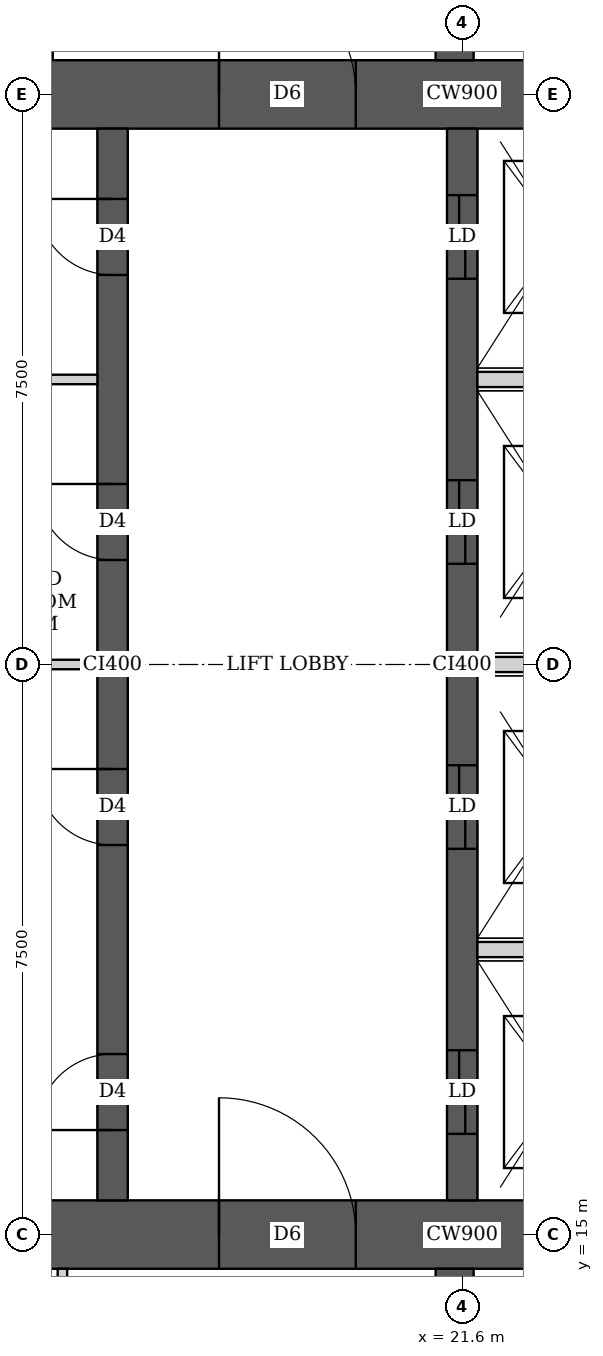
"""IFC4 building model, lengths in metres.
Left out: names, types, materials, properties, quantities, classifications, styles, units other than length and angle.
Written with IfcOpenShell. Run it as: python <this file> out.ifc"""

import sys

from ifc_helpers import new_model, si_unit, direction, frame, frame_2d, origin, place, context, subcontext, project, spatial, rectangle, extrude, element, fill, save


model = new_model("IFC4")
c1 = context("Model", 3, precision=1e-05, world=origin(), true_north=direction((0.0, 1.0)))
c2 = subcontext(c1, "Body", "Model", "MODEL_VIEW")
j1 = project(units=[si_unit("LENGTHUNIT", "METRE"), si_unit("PLANEANGLEUNIT", "RADIAN")], contexts=[c1])
p1 = place(None, origin())
s1 = spatial("IfcSite", under=j1, at=p1, CompositionType="ELEMENT")
p2 = place(p1, origin())
s2 = spatial("IfcBuilding", under=s1, at=p2, CompositionType="ELEMENT")
p3 = place(p2, frame((0.0, 0.0, 184.55)))
s3 = spatial("IfcBuildingStorey", under=s2, at=p3, CompositionType="ELEMENT", Elevation=184.55)
p4 = place(p3, frame((13.95, 15.0, 0.0), z_axis=(0.0, 0.0, 1.0), x_axis=(1.0, 0.0, 0.0)))
e1 = element("IfcWall", 1, at=p4, inside=s3, PredefinedType="SHEAR", context=c2, shape_type="SweptSolid", body=[
    extrude(rectangle(XDim=15.3, YDim=0.9, at=frame_2d((7.65, 0.0))), origin(), (0.0, 0.0, 1.0), 3.75),
])
p5 = place(p4, frame((4.45, 0.0, 0.0)))
e2 = element("IfcOpeningElement", 2, at=p5, cuts=e1, PredefinedType="OPENING", context=c2, shape_type="SweptSolid", body=[
    extrude(rectangle(XDim=1.8, YDim=2.1, at=frame_2d((0.9, 1.05))), frame((0.0, 0.46, 0.0), z_axis=(0.0, -1.0, 0.0), x_axis=(1.0, 0.0, 0.0)), (0.0, 0.0, 1.0), 0.92),
])
p6 = place(p4, frame((10.7, 0.0, 0.0)))
e3 = element("IfcOpeningElement", 3, at=p6, cuts=e1, PredefinedType="OPENING", context=c2, shape_type="SweptSolid", body=[
    extrude(rectangle(XDim=1.1, YDim=2.1, at=frame_2d((0.55, 1.05))), frame((0.0, 0.46, 0.0), z_axis=(0.0, -1.0, 0.0), x_axis=(1.0, 0.0, 0.0)), (0.0, 0.0, 1.0), 0.92),
])
p7 = place(p3, frame((13.95, 30.0, 0.0), z_axis=(0.0, 0.0, 1.0), x_axis=(1.0, 0.0, 0.0)))
e4 = element("IfcWall", 4, at=p7, inside=s3, PredefinedType="SHEAR", context=c2, shape_type="SweptSolid", body=[
    extrude(rectangle(XDim=15.3, YDim=0.9, at=frame_2d((7.65, 0.0))), origin(), (0.0, 0.0, 1.0), 3.75),
])
p8 = place(p7, frame((4.45, 0.0, 0.0)))
e5 = element("IfcOpeningElement", 5, at=p8, cuts=e4, PredefinedType="OPENING", context=c2, shape_type="SweptSolid", body=[
    extrude(rectangle(XDim=1.8, YDim=2.1, at=frame_2d((0.9, 1.05))), frame((0.0, 0.46, 0.0), z_axis=(0.0, -1.0, 0.0), x_axis=(1.0, 0.0, 0.0)), (0.0, 0.0, 1.0), 0.92),
])
p9 = place(p7, frame((10.7, 0.0, 0.0)))
e6 = element("IfcOpeningElement", 6, at=p9, cuts=e4, PredefinedType="OPENING", context=c2, shape_type="SweptSolid", body=[
    extrude(rectangle(XDim=1.1, YDim=2.1, at=frame_2d((0.55, 1.05))), frame((0.0, 0.46, 0.0), z_axis=(0.0, -1.0, 0.0), x_axis=(1.0, 0.0, 0.0)), (0.0, 0.0, 1.0), 0.92),
])
p10 = place(p3, frame((17.0, 15.45, 0.0), z_axis=(0.0, 0.0, 1.0), x_axis=(0.0, 1.0, 0.0)))
e7 = element("IfcWall", 7, at=p10, inside=s3, PredefinedType="SHEAR", context=c2, shape_type="SweptSolid", body=[
    extrude(rectangle(XDim=14.1, YDim=0.4, at=frame_2d((7.05, 0.0))), origin(), (0.0, 0.0, 1.0), 3.75),
])
p11 = place(p10, frame((0.925, 0.0, 0.0)))
e8 = element("IfcOpeningElement", 8, at=p11, cuts=e7, PredefinedType="OPENING", context=c2, shape_type="SweptSolid", body=[
    extrude(rectangle(XDim=1.0, YDim=2.1, at=frame_2d((0.5, 1.05))), frame((0.0, 0.21, 0.0), z_axis=(0.0, -1.0, 0.0), x_axis=(1.0, 0.0, 0.0)), (0.0, 0.0, 1.0), 0.42),
])
p12 = place(p10, frame((4.675, 0.0, 0.0)))
e9 = element("IfcOpeningElement", 9, at=p12, cuts=e7, PredefinedType="OPENING", context=c2, shape_type="SweptSolid", body=[
    extrude(rectangle(XDim=1.0, YDim=2.1, at=frame_2d((0.5, 1.05))), frame((0.0, 0.21, 0.0), z_axis=(0.0, -1.0, 0.0), x_axis=(1.0, 0.0, 0.0)), (0.0, 0.0, 1.0), 0.42),
])
p13 = place(p10, frame((8.425, 0.0, 0.0)))
e10 = element("IfcOpeningElement", 10, at=p13, cuts=e7, PredefinedType="OPENING", context=c2, shape_type="SweptSolid", body=[
    extrude(rectangle(XDim=1.0, YDim=2.1, at=frame_2d((0.5, 1.05))), frame((0.0, 0.21, 0.0), z_axis=(0.0, -1.0, 0.0), x_axis=(1.0, 0.0, 0.0)), (0.0, 0.0, 1.0), 0.42),
])
p14 = place(p10, frame((12.175, 0.0, 0.0)))
e11 = element("IfcOpeningElement", 11, at=p14, cuts=e7, PredefinedType="OPENING", context=c2, shape_type="SweptSolid", body=[
    extrude(rectangle(XDim=1.0, YDim=2.1, at=frame_2d((0.5, 1.05))), frame((0.0, 0.21, 0.0), z_axis=(0.0, -1.0, 0.0), x_axis=(1.0, 0.0, 0.0)), (0.0, 0.0, 1.0), 0.42),
])
p15 = place(p3, frame((21.6, 15.45, 0.0), z_axis=(0.0, 0.0, 1.0), x_axis=(0.0, 1.0, 0.0)))
e12 = element("IfcWall", 12, at=p15, inside=s3, PredefinedType="SHEAR", context=c2, shape_type="SweptSolid", body=[
    extrude(rectangle(XDim=14.1, YDim=0.4, at=frame_2d((7.05, 0.0))), origin(), (0.0, 0.0, 1.0), 3.75),
])
p16 = place(p15, frame((0.875, 0.0, 0.0)))
e13 = element("IfcOpeningElement", 13, at=p16, cuts=e12, PredefinedType="OPENING", context=c2, shape_type="SweptSolid", body=[
    extrude(rectangle(XDim=1.1, YDim=2.1, at=frame_2d((0.55, 1.05))), frame((0.0, 0.21, 0.0), z_axis=(0.0, -1.0, 0.0), x_axis=(1.0, 0.0, 0.0)), (0.0, 0.0, 1.0), 0.42),
])
p17 = place(p15, frame((4.625, 0.0, 0.0)))
e14 = element("IfcOpeningElement", 14, at=p17, cuts=e12, PredefinedType="OPENING", context=c2, shape_type="SweptSolid", body=[
    extrude(rectangle(XDim=1.1, YDim=2.1, at=frame_2d((0.55, 1.05))), frame((0.0, 0.21, 0.0), z_axis=(0.0, -1.0, 0.0), x_axis=(1.0, 0.0, 0.0)), (0.0, 0.0, 1.0), 0.42),
])
p18 = place(p15, frame((8.375, 0.0, 0.0)))
e15 = element("IfcOpeningElement", 15, at=p18, cuts=e12, PredefinedType="OPENING", context=c2, shape_type="SweptSolid", body=[
    extrude(rectangle(XDim=1.1, YDim=2.1, at=frame_2d((0.55, 1.05))), frame((0.0, 0.21, 0.0), z_axis=(0.0, -1.0, 0.0), x_axis=(1.0, 0.0, 0.0)), (0.0, 0.0, 1.0), 0.42),
])
p19 = place(p15, frame((12.125, 0.0, 0.0)))
e16 = element("IfcOpeningElement", 16, at=p19, cuts=e12, PredefinedType="OPENING", context=c2, shape_type="SweptSolid", body=[
    extrude(rectangle(XDim=1.1, YDim=2.1, at=frame_2d((0.55, 1.05))), frame((0.0, 0.21, 0.0), z_axis=(0.0, -1.0, 0.0), x_axis=(1.0, 0.0, 0.0)), (0.0, 0.0, 1.0), 0.42),
])
for number, where, z_axis, x_axis in (
    (17, (21.5, 10.35, 0.0), (0.0, 0.0, 1.0), (0.0, 1.0, 0.0)),
    (18, (21.5, 30.45, 0.0), (0.0, 0.0, 1.0), (0.0, 1.0, 0.0)),
):
    element("IfcWall", number, at=place(p3, frame(where, z_axis=z_axis, x_axis=x_axis)), inside=s3, PredefinedType="SHEAR", context=c2, shape_type="SweptSolid", body=[
        extrude(rectangle(XDim=4.2, YDim=0.5, at=frame_2d((2.1, 0.0))), origin(), (0.0, 0.0, 1.0), 3.75),
    ])
p20 = place(p3, frame((16.34, 10.413, 0.0), z_axis=(0.0, 0.0, 1.0), x_axis=(0.0, 1.0, 0.0)))
e19 = element("IfcWall", 19, at=p20, inside=s3, PredefinedType="PARTITIONING", context=c2, shape_type="SweptSolid", body=[
    extrude(rectangle(XDim=4.137, YDim=0.125, at=frame_2d((2.068, 0.0))), origin(), (0.0, 0.0, 1.0), 3.45),
])
p21 = place(p20, frame((1.512, 0.0, 0.0)))
e20 = element("IfcOpeningElement", 20, at=p21, cuts=e19, PredefinedType="OPENING", context=c2, shape_type="SweptSolid", body=[
    extrude(rectangle(XDim=1.0, YDim=2.1, at=frame_2d((0.5, 1.05))), frame((0.0, 0.073, 0.0), z_axis=(0.0, -1.0, 0.0), x_axis=(1.0, 0.0, 0.0)), (0.0, 0.0, 1.0), 0.145),
])
p22 = place(p3, frame((16.15, 30.45, 0.0), z_axis=(0.0, 0.0, 1.0), x_axis=(0.0, 1.0, 0.0)))
e21 = element("IfcWall", 21, at=p22, inside=s3, PredefinedType="PARTITIONING", context=c2, shape_type="SweptSolid", body=[
    extrude(rectangle(XDim=4.137, YDim=0.125, at=frame_2d((2.068, 0.0))), origin(), (0.0, 0.0, 1.0), 3.45),
])
p23 = place(p22, frame((1.625, 0.0, 0.0)))
e22 = element("IfcOpeningElement", 22, at=p23, cuts=e21, PredefinedType="OPENING", context=c2, shape_type="SweptSolid", body=[
    extrude(rectangle(XDim=1.0, YDim=2.1, at=frame_2d((0.5, 1.05))), frame((0.0, 0.073, 0.0), z_axis=(0.0, -1.0, 0.0), x_axis=(1.0, 0.0, 0.0)), (0.0, 0.0, 1.0), 0.145),
])
for number, where, z_axis, x_axis in (
    (23, (14.85, 22.5, 0.0), (0.0, 0.0, 1.0), (1.0, 0.0, 0.0)),
    (24, (14.85, 26.25, 0.0), (0.0, 0.0, 1.0), (1.0, 0.0, 0.0)),
):
    element("IfcWall", number, at=place(p3, frame(where, z_axis=z_axis, x_axis=x_axis)), inside=s3, PredefinedType="PARTITIONING", context=c2, shape_type="SweptSolid", body=[
        extrude(rectangle(XDim=1.95, YDim=0.125, at=frame_2d((0.975, 0.0))), origin(), (0.0, 0.0, 1.0), 3.45),
    ])
for number, where, z_axis, x_axis in (
    (25, (21.8, 18.75, 0.0), (0.0, 0.0, 1.0), (1.0, 0.0, 0.0)),
    (26, (21.8, 22.5, 0.0), (0.0, 0.0, 1.0), (1.0, 0.0, 0.0)),
    (27, (21.8, 26.25, 0.0), (0.0, 0.0, 1.0), (1.0, 0.0, 0.0)),
):
    element("IfcWall", number, at=place(p3, frame(where, z_axis=z_axis, x_axis=x_axis)), inside=s3, PredefinedType="SOLIDWALL", context=c2, shape_type="SweptSolid", body=[
        extrude(rectangle(XDim=2.2, YDim=0.2, at=frame_2d((1.1, 0.0))), origin(), (0.0, 0.0, 1.0), 3.45),
    ])
p24 = place(p11, origin())
e28 = element("IfcDoor", 28, at=p24, inside=s3, OperationType="SINGLE_SWING_LEFT", PredefinedType="DOOR", context=c2, shape_type="SweptSolid", body=[
    extrude(rectangle(XDim=1.0, YDim=2.1, at=frame_2d((0.5, 1.05))), frame((0.0, 0.025, 0.0), z_axis=(0.0, -1.0, 0.0), x_axis=(1.0, 0.0, 0.0)), (0.0, 0.0, 1.0), 0.05),
])
fill(e8, e28)
p25 = place(p12, origin())
e29 = element("IfcDoor", 29, at=p25, inside=s3, OperationType="SINGLE_SWING_RIGHT", PredefinedType="DOOR", context=c2, shape_type="SweptSolid", body=[
    extrude(rectangle(XDim=1.0, YDim=2.1, at=frame_2d((0.5, 1.05))), frame((0.0, 0.025, 0.0), z_axis=(0.0, -1.0, 0.0), x_axis=(1.0, 0.0, 0.0)), (0.0, 0.0, 1.0), 0.05),
])
fill(e9, e29)
p26 = place(p13, origin())
e30 = element("IfcDoor", 30, at=p26, inside=s3, OperationType="SINGLE_SWING_RIGHT", PredefinedType="DOOR", context=c2, shape_type="SweptSolid", body=[
    extrude(rectangle(XDim=1.0, YDim=2.1, at=frame_2d((0.5, 1.05))), frame((0.0, 0.025, 0.0), z_axis=(0.0, -1.0, 0.0), x_axis=(1.0, 0.0, 0.0)), (0.0, 0.0, 1.0), 0.05),
])
fill(e10, e30)
p27 = place(p14, origin())
e31 = element("IfcDoor", 31, at=p27, inside=s3, OperationType="SINGLE_SWING_RIGHT", PredefinedType="DOOR", context=c2, shape_type="SweptSolid", body=[
    extrude(rectangle(XDim=1.0, YDim=2.1, at=frame_2d((0.5, 1.05))), frame((0.0, 0.025, 0.0), z_axis=(0.0, -1.0, 0.0), x_axis=(1.0, 0.0, 0.0)), (0.0, 0.0, 1.0), 0.05),
])
fill(e11, e31)
p28 = place(p5, origin())
e32 = element("IfcDoor", 32, at=p28, inside=s3, OperationType="DOUBLE_DOOR_SINGLE_SWING", PredefinedType="DOOR", context=c2, shape_type="SweptSolid", body=[
    extrude(rectangle(XDim=1.8, YDim=2.1, at=frame_2d((0.9, 1.05))), frame((0.0, 0.025, 0.0), z_axis=(0.0, -1.0, 0.0), x_axis=(1.0, 0.0, 0.0)), (0.0, 0.0, 1.0), 0.05),
])
fill(e2, e32)
p29 = place(p8, origin())
e33 = element("IfcDoor", 33, at=p29, inside=s3, OperationType="DOUBLE_DOOR_SINGLE_SWING", PredefinedType="DOOR", context=c2, shape_type="SweptSolid", body=[
    extrude(rectangle(XDim=1.8, YDim=2.1, at=frame_2d((0.9, 1.05))), frame((0.0, 0.025, 0.0), z_axis=(0.0, -1.0, 0.0), x_axis=(1.0, 0.0, 0.0)), (0.0, 0.0, 1.0), 0.05),
])
fill(e5, e33)
p30 = place(p16, origin())
e34 = element("IfcDoor", 34, at=p30, inside=s3, OperationType="DOUBLE_DOOR_SLIDING", PredefinedType="DOOR", context=c2, shape_type="SweptSolid", body=[
    extrude(rectangle(XDim=1.1, YDim=2.1, at=frame_2d((0.55, 1.05))), frame((0.0, 0.025, 0.0), z_axis=(0.0, -1.0, 0.0), x_axis=(1.0, 0.0, 0.0)), (0.0, 0.0, 1.0), 0.05),
])
fill(e13, e34)
p31 = place(p17, origin())
e35 = element("IfcDoor", 35, at=p31, inside=s3, OperationType="DOUBLE_DOOR_SLIDING", PredefinedType="DOOR", context=c2, shape_type="SweptSolid", body=[
    extrude(rectangle(XDim=1.1, YDim=2.1, at=frame_2d((0.55, 1.05))), frame((0.0, 0.025, 0.0), z_axis=(0.0, -1.0, 0.0), x_axis=(1.0, 0.0, 0.0)), (0.0, 0.0, 1.0), 0.05),
])
fill(e14, e35)
p32 = place(p18, origin())
e36 = element("IfcDoor", 36, at=p32, inside=s3, OperationType="DOUBLE_DOOR_SLIDING", PredefinedType="DOOR", context=c2, shape_type="SweptSolid", body=[
    extrude(rectangle(XDim=1.1, YDim=2.1, at=frame_2d((0.55, 1.05))), frame((0.0, 0.025, 0.0), z_axis=(0.0, -1.0, 0.0), x_axis=(1.0, 0.0, 0.0)), (0.0, 0.0, 1.0), 0.05),
])
fill(e15, e36)
p33 = place(p19, origin())
e37 = element("IfcDoor", 37, at=p33, inside=s3, OperationType="DOUBLE_DOOR_SLIDING", PredefinedType="DOOR", context=c2, shape_type="SweptSolid", body=[
    extrude(rectangle(XDim=1.1, YDim=2.1, at=frame_2d((0.55, 1.05))), frame((0.0, 0.025, 0.0), z_axis=(0.0, -1.0, 0.0), x_axis=(1.0, 0.0, 0.0)), (0.0, 0.0, 1.0), 0.05),
])
fill(e16, e37)
save(model, sys.argv[1])
